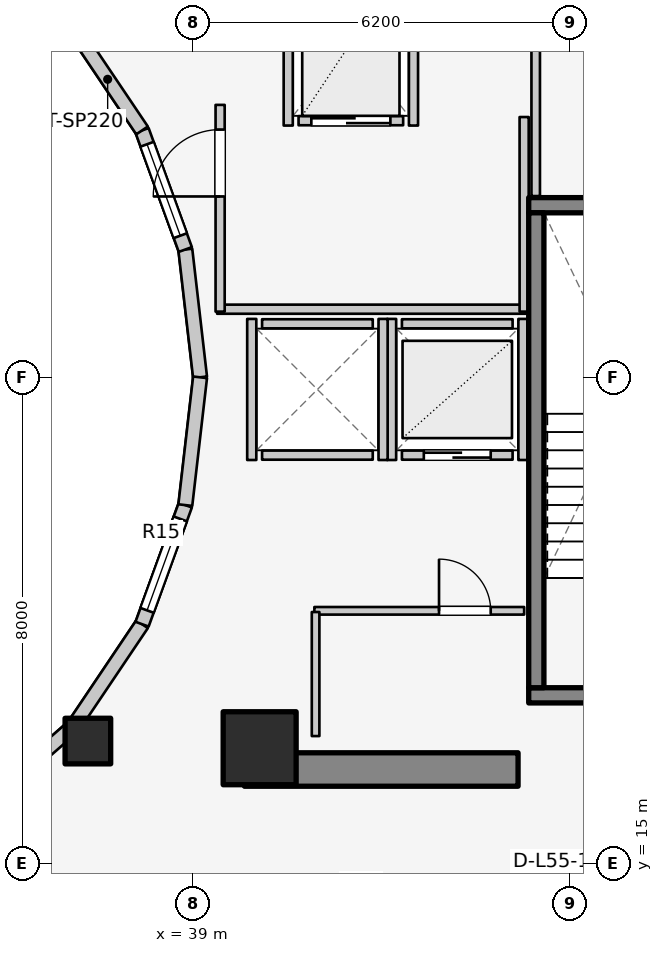
"""IFC4 building model, lengths in metres.
Left out: names, types, materials, properties, quantities, classifications, styles, units other than length and angle.
Written with IfcOpenShell. Run it as: python <this file> out.ifc"""

import sys

from ifc_helpers import new_model, si_unit, direction, frame, frame_2d, origin, origin_2d, place, context, subcontext, project, spatial, rectangle, extrude, element, fill, save


model = new_model("IFC4")
c1 = context("Model", 3, precision=1e-05, world=origin(), true_north=direction((0.0, 1.0)))
c2 = subcontext(c1, "Body", "Model", "MODEL_VIEW")
j1 = project(units=[si_unit("LENGTHUNIT", "METRE"), si_unit("PLANEANGLEUNIT", "RADIAN")], contexts=[c1])
p1 = place(None, origin())
s1 = spatial("IfcSite", under=j1, at=p1, CompositionType="ELEMENT")
p2 = place(p1, origin())
s2 = spatial("IfcBuilding", under=s1, at=p2, CompositionType="ELEMENT")
p3 = place(p2, frame((0.0, 0.0, 180.8)))
s3 = spatial("IfcBuildingStorey", under=s2, at=p3, CompositionType="ELEMENT", Elevation=180.8)
p4 = place(p3, frame((39.85, 16.55, 0.0), z_axis=(0.0, 0.0, 1.0), x_axis=(1.0, 0.0, 0.0)))
e1 = element("IfcWall", 1, at=p4, inside=s3, PredefinedType="SHEAR", context=c2, shape_type="SweptSolid", body=[
    extrude(rectangle(XDim=4.5, YDim=0.55, at=frame_2d((2.25, 0.0))), origin(), (0.0, 0.0, 1.0), 3.1),
])
p5 = place(p3, frame((44.525, 17.77, 0.0), z_axis=(0.0, 0.0, 1.0), x_axis=(1.0, 0.0, 0.0)))
e2 = element("IfcWall", 2, at=p5, inside=s3, PredefinedType="SOLIDWALL", context=c2, shape_type="SweptSolid", body=[
    extrude(rectangle(XDim=3.37, YDim=0.25, at=frame_2d((1.685, 0.0))), origin(), (0.0, 0.0, 1.0), 3.1),
])
p6 = place(p5, frame((1.135, 0.0, 0.0)))
e3 = element("IfcOpeningElement", 3, at=p6, cuts=e2, PredefinedType="OPENING", context=c2, shape_type="SweptSolid", body=[
    extrude(rectangle(XDim=1.1, YDim=2.1, at=frame_2d((0.55, 1.05))), frame((0.0, 0.135, 0.0), z_axis=(0.0, -1.0, 0.0), x_axis=(1.0, 0.0, 0.0)), (0.0, 0.0, 1.0), 0.27),
])
p7 = place(p3, frame((44.525, 25.83, 0.0), z_axis=(0.0, 0.0, 1.0), x_axis=(1.0, 0.0, 0.0)))
e4 = element("IfcWall", 4, at=p7, inside=s3, PredefinedType="SOLIDWALL", context=c2, shape_type="SweptSolid", body=[
    extrude(rectangle(XDim=3.37, YDim=0.25, at=frame_2d((1.685, 0.0))), origin(), (0.0, 0.0, 1.0), 3.1),
])
p8 = place(p3, frame((44.65, 17.895, 0.0), z_axis=(0.0, 0.0, 1.0), x_axis=(0.0, 1.0, 0.0)))
e5 = element("IfcWall", 5, at=p8, inside=s3, PredefinedType="SOLIDWALL", context=c2, shape_type="SweptSolid", body=[
    extrude(rectangle(XDim=7.81, YDim=0.25, at=frame_2d((3.905, 0.0))), origin(), (0.0, 0.0, 1.0), 3.1),
])
p9 = place(p3, frame((40.1, 16.9, 0.0), z_axis=(0.0, 0.0, 1.0), x_axis=(1.0, 0.0, 0.0)))
e6 = element("IfcColumn", 6, at=p9, inside=s3, PredefinedType="COLUMN", context=c2, shape_type="SweptSolid", body=[
    extrude(rectangle(XDim=1.2, YDim=1.2, at=origin_2d()), origin(), (0.0, 0.0, 1.0), 3.1),
])
p10 = place(p3, frame((37.275, 17.018, 0.0), z_axis=(0.0, 0.0, 1.0), x_axis=(1.0, 0.0, 0.0)))
e7 = element("IfcColumn", 7, at=p10, inside=s3, PredefinedType="COLUMN", context=c2, shape_type="SweptSolid", body=[
    extrude(rectangle(XDim=0.75, YDim=0.75, at=origin_2d()), origin(), (0.0, 0.0, 1.0), 3.1),
])
p11 = place(p3, frame((39.12, 23.0, 0.0), z_axis=(0.0, 0.0, 1.0), x_axis=(-0.114711713601, 0.993398823617, 0.0)))
e8 = element("IfcWall", 8, at=p11, inside=s3, PredefinedType="STANDARD", context=c2, shape_type="SweptSolid", body=[
    extrude(rectangle(XDim=2.115, YDim=0.23, at=frame_2d((1.058, 0.0))), origin(), (0.0, 0.0, 1.0), 2.84),
])
p12 = place(p3, frame((38.877, 25.102, 0.0), z_axis=(0.0, 0.0, 1.0), x_axis=(-0.341423187295, 0.93990968033, 0.0)))
e9 = element("IfcWall", 9, at=p12, inside=s3, PredefinedType="STANDARD", context=c2, shape_type="SweptSolid", body=[
    extrude(rectangle(XDim=2.084, YDim=0.23, at=frame_2d((1.042, 0.0))), origin(), (0.0, 0.0, 1.0), 2.84),
])
p13 = place(p12, frame((0.242, 0.0, 0.85)))
e10 = element("IfcOpeningElement", 10, at=p13, cuts=e9, PredefinedType="OPENING", context=c2, shape_type="SweptSolid", body=[
    extrude(rectangle(XDim=1.6, YDim=1.65, at=frame_2d((0.8, 0.825))), frame((0.0, 0.125, 0.0), z_axis=(0.0, -1.0, 0.0), x_axis=(1.0, 0.0, 0.0)), (0.0, 0.0, 1.0), 0.25),
])
p14 = place(p3, frame((38.166, 27.06, 0.0), z_axis=(0.0, 0.0, 1.0), x_axis=(-0.558197800898, 0.829707909492, 0.0)))
e11 = element("IfcWall", 11, at=p14, inside=s3, PredefinedType="STANDARD", context=c2, shape_type="SweptSolid", body=[
    extrude(rectangle(XDim=2.027, YDim=0.23, at=frame_2d((1.013, 0.0))), origin(), (0.0, 0.0, 1.0), 2.16),
])
p15 = place(p3, frame((35.56, 15.968, 0.0), z_axis=(0.0, 0.0, 1.0), x_axis=(0.752576694707, 0.658504607869, 0.0)))
e12 = element("IfcWall", 12, at=p15, inside=s3, PredefinedType="STANDARD", context=c2, shape_type="SweptSolid", body=[
    extrude(rectangle(XDim=1.959, YDim=0.23, at=frame_2d((0.98, 0.0))), origin(), (0.0, 0.0, 1.0), 2.16),
])
p16 = place(p3, frame((37.035, 17.258, 0.0), z_axis=(0.0, 0.0, 1.0), x_axis=(0.558197800898, 0.829707909492, 0.0)))
e13 = element("IfcWall", 13, at=p16, inside=s3, PredefinedType="STANDARD", context=c2, shape_type="SweptSolid", body=[
    extrude(rectangle(XDim=2.027, YDim=0.23, at=frame_2d((1.013, 0.0))), origin(), (0.0, 0.0, 1.0), 2.16),
])
p17 = place(p3, frame((38.166, 18.94, 0.0), z_axis=(0.0, 0.0, 1.0), x_axis=(0.341423187295, 0.93990968033, 0.0)))
e14 = element("IfcWall", 14, at=p17, inside=s3, PredefinedType="STANDARD", context=c2, shape_type="SweptSolid", body=[
    extrude(rectangle(XDim=2.084, YDim=0.23, at=frame_2d((1.042, 0.0))), origin(), (0.0, 0.0, 1.0), 2.84),
])
p18 = place(p17, frame((0.242, 0.0, 0.85)))
e15 = element("IfcOpeningElement", 15, at=p18, cuts=e14, PredefinedType="OPENING", context=c2, shape_type="SweptSolid", body=[
    extrude(rectangle(XDim=1.6, YDim=1.65, at=frame_2d((0.8, 0.825))), frame((0.0, 0.125, 0.0), z_axis=(0.0, -1.0, 0.0), x_axis=(1.0, 0.0, 0.0)), (0.0, 0.0, 1.0), 0.25),
])
p19 = place(p3, frame((38.877, 20.898, 0.0), z_axis=(0.0, 0.0, 1.0), x_axis=(0.114711713601, 0.993398823617, 0.0)))
e16 = element("IfcWall", 16, at=p19, inside=s3, PredefinedType="STANDARD", context=c2, shape_type="SweptSolid", body=[
    extrude(rectangle(XDim=2.115, YDim=0.23, at=frame_2d((1.058, 0.0))), origin(), (0.0, 0.0, 1.0), 2.84),
])
p20 = place(p3, frame((42.44, 21.72, 0.0), z_axis=(0.0, 0.0, 1.0), x_axis=(1.0, 0.0, 0.0)))
e17 = element("IfcWall", 17, at=p20, inside=s3, PredefinedType="SOLIDWALL", context=c2, shape_type="SweptSolid", body=[
    extrude(rectangle(XDim=1.82, YDim=0.15, at=frame_2d((0.91, 0.0))), origin(), (0.0, 0.0, 1.0), 2.855),
])
p21 = place(p20, frame((0.36, 0.0, 0.0)))
e18 = element("IfcOpeningElement", 18, at=p21, cuts=e17, PredefinedType="OPENING", context=c2, shape_type="SweptSolid", body=[
    extrude(rectangle(XDim=1.1, YDim=2.1, at=frame_2d((0.55, 1.05))), frame((0.0, 0.085, 0.0), z_axis=(0.0, -1.0, 0.0), x_axis=(1.0, 0.0, 0.0)), (0.0, 0.0, 1.0), 0.17),
])
p22 = place(p3, frame((42.44, 23.88, 0.0), z_axis=(0.0, 0.0, 1.0), x_axis=(1.0, 0.0, 0.0)))
e19 = element("IfcWall", 19, at=p22, inside=s3, PredefinedType="SOLIDWALL", context=c2, shape_type="SweptSolid", body=[
    extrude(rectangle(XDim=1.82, YDim=0.15, at=frame_2d((0.91, 0.0))), origin(), (0.0, 0.0, 1.0), 2.855),
])
for number, where, z_axis, x_axis in (
    (20, (42.27, 21.64, 0.0), (0.0, 0.0, 1.0), (0.0, 1.0, 0.0)),
    (21, (44.43, 21.64, 0.0), (0.0, 0.0, 1.0), (0.0, 1.0, 0.0)),
):
    element("IfcWall", number, at=place(p3, frame(where, z_axis=z_axis, x_axis=x_axis)), inside=s3, PredefinedType="SOLIDWALL", context=c2, shape_type="SweptSolid", body=[
        extrude(rectangle(XDim=2.32, YDim=0.15, at=frame_2d((1.16, 0.0))), origin(), (0.0, 0.0, 1.0), 2.855),
    ])
for number, where, z_axis, x_axis in (
    (22, (40.14, 21.72, 0.0), (0.0, 0.0, 1.0), (1.0, 0.0, 0.0)),
    (23, (40.14, 23.88, 0.0), (0.0, 0.0, 1.0), (1.0, 0.0, 0.0)),
):
    element("IfcWall", number, at=place(p3, frame(where, z_axis=z_axis, x_axis=x_axis)), inside=s3, PredefinedType="SOLIDWALL", context=c2, shape_type="SweptSolid", body=[
        extrude(rectangle(XDim=1.82, YDim=0.15, at=frame_2d((0.91, 0.0))), origin(), (0.0, 0.0, 1.0), 2.12),
    ])
p23 = place(p3, frame((39.97, 21.64, 0.0), z_axis=(0.0, 0.0, 1.0), x_axis=(0.0, 1.0, 0.0)))
e24 = element("IfcWall", 24, at=p23, inside=s3, PredefinedType="SOLIDWALL", context=c2, shape_type="SweptSolid", body=[
    extrude(rectangle(XDim=2.32, YDim=0.15, at=frame_2d((1.16, 0.0))), origin(), (0.0, 0.0, 1.0), 2.12),
])
p24 = place(p3, frame((42.13, 21.64, 0.0), z_axis=(0.0, 0.0, 1.0), x_axis=(0.0, 1.0, 0.0)))
e25 = element("IfcWall", 25, at=p24, inside=s3, PredefinedType="SOLIDWALL", context=c2, shape_type="SweptSolid", body=[
    extrude(rectangle(XDim=2.32, YDim=0.15, at=frame_2d((1.16, 0.0))), origin(), (0.0, 0.0, 1.0), 2.855),
])
p25 = place(p3, frame((40.74, 27.22, 0.0), z_axis=(0.0, 0.0, 1.0), x_axis=(1.0, 0.0, 0.0)))
e26 = element("IfcWall", 26, at=p25, inside=s3, PredefinedType="SOLIDWALL", context=c2, shape_type="SweptSolid", body=[
    extrude(rectangle(XDim=1.72, YDim=0.15, at=frame_2d((0.86, 0.0))), origin(), (0.0, 0.0, 1.0), 2.855),
])
p26 = place(p25, frame((0.21, 0.0, 0.0)))
e27 = element("IfcOpeningElement", 27, at=p26, cuts=e26, PredefinedType="OPENING", context=c2, shape_type="SweptSolid", body=[
    extrude(rectangle(XDim=1.3, YDim=2.1, at=frame_2d((0.65, 1.05))), frame((0.0, 0.085, 0.0), z_axis=(0.0, -1.0, 0.0), x_axis=(1.0, 0.0, 0.0)), (0.0, 0.0, 1.0), 0.17),
])
for number, where, z_axis, x_axis in (
    (28, (40.57, 27.14, 0.0), (0.0, 0.0, 1.0), (0.0, 1.0, 0.0)),
    (29, (42.63, 27.14, 0.0), (0.0, 0.0, 1.0), (0.0, 1.0, 0.0)),
):
    element("IfcWall", number, at=place(p3, frame(where, z_axis=z_axis, x_axis=x_axis)), inside=s3, PredefinedType="SOLIDWALL", context=c2, shape_type="SweptSolid", body=[
        extrude(rectangle(XDim=2.72, YDim=0.15, at=frame_2d((1.36, 0.0))), origin(), (0.0, 0.0, 1.0), 2.855),
    ])
p27 = place(p3, frame((39.4, 24.12, 0.0), z_axis=(0.0, 0.0, 1.0), x_axis=(1.0, 0.0, 0.0)))
e30 = element("IfcWall", 30, at=p27, inside=s3, PredefinedType="PARTITIONING", context=c2, shape_type="SweptSolid", body=[
    extrude(rectangle(XDim=5.08, YDim=0.15, at=frame_2d((2.54, 0.0))), origin(), (0.0, 0.0, 1.0), 2.12),
])
p28 = place(p3, frame((44.45, 24.08, 0.0), z_axis=(0.0, 0.0, 1.0), x_axis=(0.0, 1.0, 0.0)))
e31 = element("IfcWall", 31, at=p28, inside=s3, PredefinedType="PARTITIONING", context=c2, shape_type="SweptSolid", body=[
    extrude(rectangle(XDim=3.2, YDim=0.15, at=frame_2d((1.6, 0.0))), origin(), (0.0, 0.0, 1.0), 2.855),
])
p29 = place(p3, frame((39.45, 24.08, 0.0), z_axis=(0.0, 0.0, 1.0), x_axis=(0.0, 1.0, 0.0)))
e32 = element("IfcWall", 32, at=p29, inside=s3, PredefinedType="PARTITIONING", context=c2, shape_type="SweptSolid", body=[
    extrude(rectangle(XDim=3.4, YDim=0.15, at=frame_2d((1.7, 0.0))), origin(), (0.0, 0.0, 1.0), 2.855),
])
p30 = place(p29, frame((1.894, 0.0, 0.0)))
e33 = element("IfcOpeningElement", 33, at=p30, cuts=e32, PredefinedType="OPENING", context=c2, shape_type="SweptSolid", body=[
    extrude(rectangle(XDim=1.1, YDim=2.1, at=frame_2d((0.55, 1.05))), frame((0.0, 0.085, 0.0), z_axis=(0.0, -1.0, 0.0), x_axis=(1.0, 0.0, 0.0)), (0.0, 0.0, 1.0), 0.17),
])
p31 = place(p3, frame((41.0, 19.16, 0.0), z_axis=(0.0, 0.0, 1.0), x_axis=(1.0, 0.0, 0.0)))
e34 = element("IfcWall", 34, at=p31, inside=s3, PredefinedType="PARTITIONING", context=c2, shape_type="SweptSolid", body=[
    extrude(rectangle(XDim=3.45, YDim=0.125, at=frame_2d((1.725, 0.0))), origin(), (0.0, 0.0, 1.0), 2.12),
])
p32 = place(p31, frame((2.05, 0.0, 0.0)))
e35 = element("IfcOpeningElement", 35, at=p32, cuts=e34, PredefinedType="OPENING", context=c2, shape_type="SweptSolid", body=[
    extrude(rectangle(XDim=0.85, YDim=2.05, at=frame_2d((0.425, 1.025))), frame((0.0, 0.073, 0.0), z_axis=(0.0, -1.0, 0.0), x_axis=(1.0, 0.0, 0.0)), (0.0, 0.0, 1.0), 0.145),
])
p33 = place(p3, frame((41.02, 17.1, 0.0), z_axis=(0.0, 0.0, 1.0), x_axis=(0.0, 1.0, 0.0)))
e36 = element("IfcWall", 36, at=p33, inside=s3, PredefinedType="PARTITIONING", context=c2, shape_type="SweptSolid", body=[
    extrude(rectangle(XDim=2.04, YDim=0.125, at=frame_2d((1.02, 0.0))), origin(), (0.0, 0.0, 1.0), 2.855),
])
p34 = place(p3, frame((44.64, 25.98, 0.0), z_axis=(0.0, 0.0, 1.0), x_axis=(0.0, 1.0, 0.0)))
e37 = element("IfcWall", 37, at=p34, inside=s3, PredefinedType="PLUMBINGWALL", context=c2, shape_type="SweptSolid", body=[
    extrude(rectangle(XDim=3.88, YDim=0.14, at=frame_2d((1.94, 0.0))), origin(), (0.0, 0.0, 1.0), 2.855),
])
p35 = place(p3, frame((35.55, 15.985, 0.0), z_axis=(0.0, 0.0, 1.0), x_axis=(0.523587550846, -0.851971875474, 0.0)))
e38 = element("IfcWall", 38, at=p35, inside=s3, PredefinedType="PARTITIONING", context=c2, shape_type="SweptSolid", body=[
    extrude(rectangle(XDim=3.153, YDim=0.125, at=frame_2d((1.577, 0.0))), origin(), (0.0, 0.0, 1.0), 2.299),
])
p36 = place(p13, origin())
e39 = element("IfcWindow", 39, at=p36, inside=s3, PartitioningType="SINGLE_PANEL", PredefinedType="WINDOW", context=c2, shape_type="SweptSolid", body=[
    extrude(rectangle(XDim=1.6, YDim=1.65, at=frame_2d((0.8, 0.825))), frame((0.0, 0.03, 0.0), z_axis=(0.0, -1.0, 0.0), x_axis=(1.0, 0.0, 0.0)), (0.0, 0.0, 1.0), 0.06),
])
fill(e10, e39)
p37 = place(p18, origin())
e40 = element("IfcWindow", 40, at=p37, inside=s3, PartitioningType="SINGLE_PANEL", PredefinedType="WINDOW", context=c2, shape_type="SweptSolid", body=[
    extrude(rectangle(XDim=1.6, YDim=1.65, at=frame_2d((0.8, 0.825))), frame((0.0, 0.03, 0.0), z_axis=(0.0, -1.0, 0.0), x_axis=(1.0, 0.0, 0.0)), (0.0, 0.0, 1.0), 0.06),
])
fill(e15, e40)
p38 = place(p21, origin())
e41 = element("IfcDoor", 41, at=p38, inside=s3, OperationType="DOUBLE_DOOR_SLIDING", PredefinedType="DOOR", context=c2, shape_type="SweptSolid", body=[
    extrude(rectangle(XDim=1.1, YDim=2.1, at=frame_2d((0.55, 1.05))), frame((0.0, 0.025, 0.0), z_axis=(0.0, -1.0, 0.0), x_axis=(1.0, 0.0, 0.0)), (0.0, 0.0, 1.0), 0.05),
])
fill(e18, e41)
p39 = place(p26, origin())
e42 = element("IfcDoor", 42, at=p39, inside=s3, OperationType="DOUBLE_DOOR_SLIDING", PredefinedType="DOOR", context=c2, shape_type="SweptSolid", body=[
    extrude(rectangle(XDim=1.3, YDim=2.1, at=frame_2d((0.65, 1.05))), frame((0.0, 0.025, 0.0), z_axis=(0.0, -1.0, 0.0), x_axis=(1.0, 0.0, 0.0)), (0.0, 0.0, 1.0), 0.05),
])
fill(e27, e42)
p40 = place(p30, origin())
e43 = element("IfcDoor", 43, at=p40, inside=s3, OperationType="SINGLE_SWING_LEFT", PredefinedType="DOOR", context=c2, shape_type="SweptSolid", body=[
    extrude(rectangle(XDim=1.1, YDim=2.1, at=frame_2d((0.55, 1.05))), frame((0.0, 0.025, 0.0), z_axis=(0.0, -1.0, 0.0), x_axis=(1.0, 0.0, 0.0)), (0.0, 0.0, 1.0), 0.05),
])
fill(e33, e43)
p41 = place(p32, origin())
e44 = element("IfcDoor", 44, at=p41, inside=s3, OperationType="SINGLE_SWING_LEFT", PredefinedType="DOOR", context=c2, shape_type="SweptSolid", body=[
    extrude(rectangle(XDim=0.85, YDim=2.05, at=frame_2d((0.425, 1.025))), frame((0.0, 0.025, 0.0), z_axis=(0.0, -1.0, 0.0), x_axis=(1.0, 0.0, 0.0)), (0.0, 0.0, 1.0), 0.05),
])
fill(e35, e44)
save(model, sys.argv[1])
